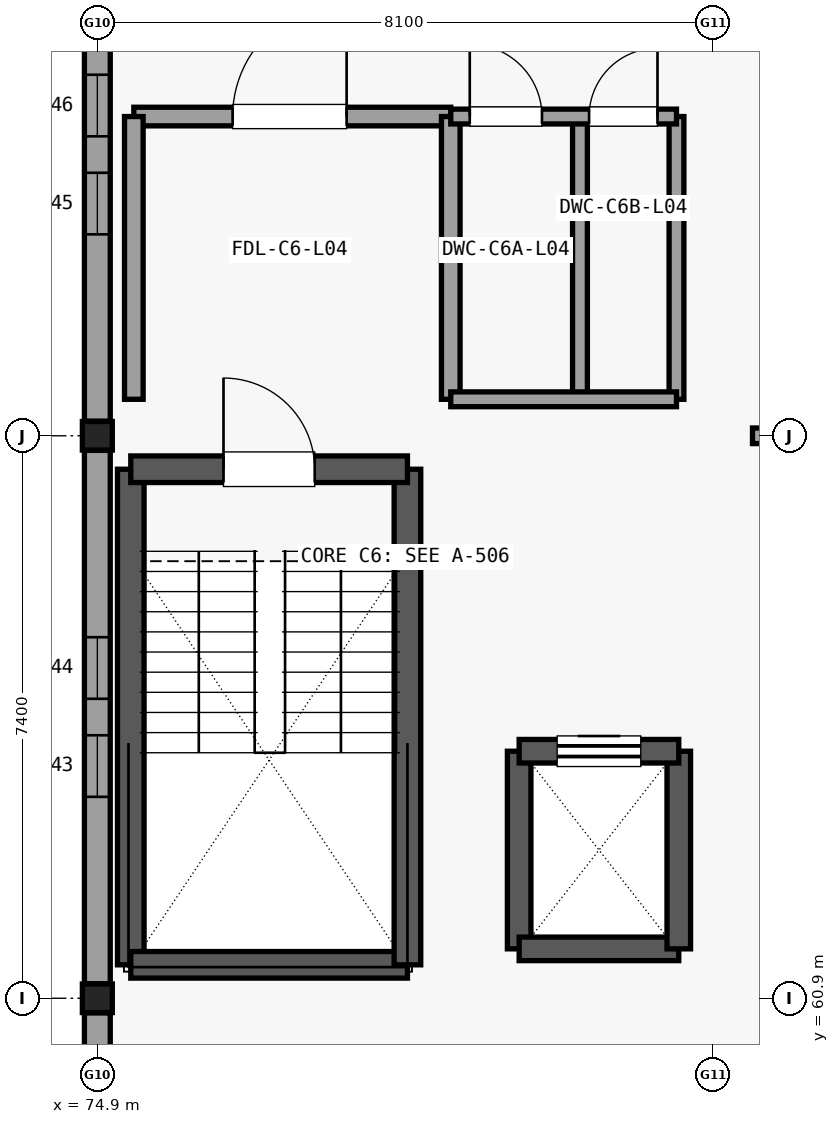
"""IFC4 building model, lengths in metres.
Left out: names, types, materials, properties, quantities, classifications, styles, units other than length and angle.
Written with IfcOpenShell. Run it as: python <this file> out.ifc"""

import sys

from ifc_helpers import new_model, si_unit, direction, frame, frame_2d, origin, origin_2d, place, context, subcontext, project, spatial, rectangle, i_section, extrude, element, fill, save


model = new_model("IFC4")
c1 = context("Model", 3, precision=1e-05, world=origin(), true_north=direction((0.0, 1.0)))
c2 = subcontext(c1, "Body", "Model", "MODEL_VIEW")
j1 = project(units=[si_unit("LENGTHUNIT", "METRE"), si_unit("PLANEANGLEUNIT", "RADIAN")], contexts=[c1])
p1 = place(None, origin())
s1 = spatial("IfcSite", under=j1, at=p1, CompositionType="ELEMENT")
p2 = place(p1, origin())
s2 = spatial("IfcBuilding", under=s1, at=p2, CompositionType="ELEMENT")
p3 = place(p2, frame((0.0, 0.0, 17.4)))
s3 = spatial("IfcBuildingStorey", under=s2, at=p3, CompositionType="ELEMENT", Elevation=17.4)
for number, where, z_axis, x_axis in (
    (1, (74.9, 60.9, 0.0), (0.0, 0.0, 1.0), (1.0, 0.0, 0.0)),
    (2, (74.9, 68.3, 0.0), (0.0, 0.0, 1.0), (1.0, 0.0, 0.0)),
):
    element("IfcColumn", number, at=place(p3, frame(where, z_axis=z_axis, x_axis=x_axis)), inside=s3, PredefinedType="COLUMN", context=c2, shape_type="SweptSolid", body=[
        extrude(i_section(OverallWidth=0.394, OverallDepth=0.376, WebThickness=0.017, FlangeThickness=0.028, at=origin_2d()), origin(), (0.0, 0.0, 1.0), 3.38),
    ])
p4 = place(p3, frame((74.9, 53.692, 0.0), z_axis=(0.0, 0.0, 1.0), x_axis=(0.0, 1.0, 0.0)))
e3 = element("IfcWall", 3, at=p4, inside=s3, PredefinedType="SOLIDWALL", context=c2, shape_type="SweptSolid", body=[
    extrude(rectangle(XDim=7.016, YDim=0.34, at=frame_2d((3.508, 0.0))), origin(), (0.0, 0.0, 1.0), 2.681),
])
p5 = place(p4, frame((2.458, 0.0, 0.6)))
e4 = element("IfcOpeningElement", 4, at=p5, cuts=e3, PredefinedType="OPENING", context=c2, shape_type="SweptSolid", body=[
    extrude(rectangle(XDim=0.81, YDim=1.84, at=frame_2d((0.405, 0.92))), frame((0.0, 0.18, 0.0), z_axis=(0.0, -1.0, 0.0), x_axis=(1.0, 0.0, 0.0)), (0.0, 0.0, 1.0), 0.36),
])
p6 = place(p4, frame((3.748, 0.0, 0.6)))
e5 = element("IfcOpeningElement", 5, at=p6, cuts=e3, PredefinedType="OPENING", context=c2, shape_type="SweptSolid", body=[
    extrude(rectangle(XDim=0.81, YDim=1.84, at=frame_2d((0.405, 0.92))), frame((0.0, 0.18, 0.0), z_axis=(0.0, -1.0, 0.0), x_axis=(1.0, 0.0, 0.0)), (0.0, 0.0, 1.0), 0.36),
])
p7 = place(p3, frame((74.9, 61.092, 0.0), z_axis=(0.0, 0.0, 1.0), x_axis=(0.0, 1.0, 0.0)))
e6 = element("IfcWall", 6, at=p7, inside=s3, PredefinedType="SOLIDWALL", context=c2, shape_type="SweptSolid", body=[
    extrude(rectangle(XDim=7.016, YDim=0.34, at=frame_2d((3.508, 0.0))), origin(), (0.0, 0.0, 1.0), 2.681),
])
p8 = place(p7, frame((2.458, 0.0, 0.6)))
e7 = element("IfcOpeningElement", 7, at=p8, cuts=e6, PredefinedType="OPENING", context=c2, shape_type="SweptSolid", body=[
    extrude(rectangle(XDim=0.81, YDim=1.84, at=frame_2d((0.405, 0.92))), frame((0.0, 0.18, 0.0), z_axis=(0.0, -1.0, 0.0), x_axis=(1.0, 0.0, 0.0)), (0.0, 0.0, 1.0), 0.36),
])
p9 = place(p7, frame((3.748, 0.0, 0.6)))
e8 = element("IfcOpeningElement", 8, at=p9, cuts=e6, PredefinedType="OPENING", context=c2, shape_type="SweptSolid", body=[
    extrude(rectangle(XDim=0.81, YDim=1.84, at=frame_2d((0.405, 0.92))), frame((0.0, 0.18, 0.0), z_axis=(0.0, -1.0, 0.0), x_axis=(1.0, 0.0, 0.0)), (0.0, 0.0, 1.0), 0.36),
])
p10 = place(p3, frame((74.9, 68.492, 0.0), z_axis=(0.0, 0.0, 1.0), x_axis=(0.0, 1.0, 0.0)))
e9 = element("IfcWall", 9, at=p10, inside=s3, PredefinedType="SOLIDWALL", context=c2, shape_type="SweptSolid", body=[
    extrude(rectangle(XDim=7.016, YDim=0.34, at=frame_2d((3.508, 0.0))), origin(), (0.0, 0.0, 1.0), 2.681),
])
p11 = place(p10, frame((2.458, 0.0, 0.6)))
e10 = element("IfcOpeningElement", 10, at=p11, cuts=e9, PredefinedType="OPENING", context=c2, shape_type="SweptSolid", body=[
    extrude(rectangle(XDim=0.81, YDim=1.84, at=frame_2d((0.405, 0.92))), frame((0.0, 0.18, 0.0), z_axis=(0.0, -1.0, 0.0), x_axis=(1.0, 0.0, 0.0)), (0.0, 0.0, 1.0), 0.36),
])
p12 = place(p10, frame((3.748, 0.0, 0.6)))
e11 = element("IfcOpeningElement", 11, at=p12, cuts=e9, PredefinedType="OPENING", context=c2, shape_type="SweptSolid", body=[
    extrude(rectangle(XDim=0.81, YDim=1.84, at=frame_2d((0.405, 0.92))), frame((0.0, 0.18, 0.0), z_axis=(0.0, -1.0, 0.0), x_axis=(1.0, 0.0, 0.0)), (0.0, 0.0, 1.0), 0.36),
])
p13 = place(p3, frame((75.34, 61.34, 0.0), z_axis=(0.0, 0.0, 1.0), x_axis=(0.0, 1.0, 0.0)))
e12 = element("IfcWall", 12, at=p13, inside=s3, PredefinedType="SHEAR", context=c2, shape_type="SweptSolid", body=[
    extrude(rectangle(XDim=6.52, YDim=0.35, at=frame_2d((3.26, 0.0))), origin(), (0.0, 0.0, 1.0), 3.375),
])
p14 = place(p3, frame((75.34, 61.34, 0.0), z_axis=(0.0, 0.0, 1.0), x_axis=(1.0, 0.0, 0.0)))
e13 = element("IfcWall", 13, at=p14, inside=s3, PredefinedType="SHEAR", context=c2, shape_type="SweptSolid", body=[
    extrude(rectangle(XDim=3.64, YDim=0.35, at=frame_2d((1.82, 0.0))), origin(), (0.0, 0.0, 1.0), 3.375),
])
p15 = place(p3, frame((78.98, 61.34, 0.0), z_axis=(0.0, 0.0, 1.0), x_axis=(0.0, 1.0, 0.0)))
e14 = element("IfcWall", 14, at=p15, inside=s3, PredefinedType="SHEAR", context=c2, shape_type="SweptSolid", body=[
    extrude(rectangle(XDim=6.52, YDim=0.35, at=frame_2d((3.26, 0.0))), origin(), (0.0, 0.0, 1.0), 3.375),
])
p16 = place(p3, frame((75.34, 67.86, 0.0), z_axis=(0.0, 0.0, 1.0), x_axis=(1.0, 0.0, 0.0)))
e15 = element("IfcWall", 15, at=p16, inside=s3, PredefinedType="SHEAR", context=c2, shape_type="SweptSolid", body=[
    extrude(rectangle(XDim=3.64, YDim=0.35, at=frame_2d((1.82, 0.0))), origin(), (0.0, 0.0, 1.0), 3.375),
])
p17 = place(p16, frame((1.22, 0.0, 0.0)))
e16 = element("IfcOpeningElement", 16, at=p17, cuts=e15, PredefinedType="OPENING", context=c2, shape_type="SweptSolid", body=[
    extrude(rectangle(XDim=1.2, YDim=2.15, at=frame_2d((0.6, 1.075))), frame((0.0, 0.185, 0.0), z_axis=(0.0, -1.0, 0.0), x_axis=(1.0, 0.0, 0.0)), (0.0, 0.0, 1.0), 0.37),
])
p18 = place(p3, frame((80.45, 61.55, 0.0), z_axis=(0.0, 0.0, 1.0), x_axis=(0.0, 1.0, 0.0)))
e17 = element("IfcWall", 17, at=p18, inside=s3, PredefinedType="SHEAR", context=c2, shape_type="SweptSolid", body=[
    extrude(rectangle(XDim=2.6, YDim=0.31, at=frame_2d((1.3, 0.0))), origin(), (0.0, 0.0, 1.0), 3.375),
])
p19 = place(p3, frame((80.45, 61.55, 0.0), z_axis=(0.0, 0.0, 1.0), x_axis=(1.0, 0.0, 0.0)))
e18 = element("IfcWall", 18, at=p19, inside=s3, PredefinedType="SHEAR", context=c2, shape_type="SweptSolid", body=[
    extrude(rectangle(XDim=2.1, YDim=0.31, at=frame_2d((1.05, 0.0))), origin(), (0.0, 0.0, 1.0), 3.375),
])
p20 = place(p3, frame((82.55, 61.55, 0.0), z_axis=(0.0, 0.0, 1.0), x_axis=(0.0, 1.0, 0.0)))
e19 = element("IfcWall", 19, at=p20, inside=s3, PredefinedType="SHEAR", context=c2, shape_type="SweptSolid", body=[
    extrude(rectangle(XDim=2.6, YDim=0.31, at=frame_2d((1.3, 0.0))), origin(), (0.0, 0.0, 1.0), 3.375),
])
p21 = place(p3, frame((80.45, 64.15, 0.0), z_axis=(0.0, 0.0, 1.0), x_axis=(1.0, 0.0, 0.0)))
e20 = element("IfcWall", 20, at=p21, inside=s3, PredefinedType="SHEAR", context=c2, shape_type="SweptSolid", body=[
    extrude(rectangle(XDim=2.1, YDim=0.31, at=frame_2d((1.05, 0.0))), origin(), (0.0, 0.0, 1.0), 3.375),
])
p22 = place(p21, frame((0.5, 0.0, 0.0)))
e21 = element("IfcOpeningElement", 21, at=p22, cuts=e20, PredefinedType="OPENING", context=c2, shape_type="SweptSolid", body=[
    extrude(rectangle(XDim=1.1, YDim=2.15, at=frame_2d((0.55, 1.075))), frame((0.0, 0.165, 0.0), z_axis=(0.0, -1.0, 0.0), x_axis=(1.0, 0.0, 0.0)), (0.0, 0.0, 1.0), 0.33),
])
p23 = place(p3, frame((75.38, 72.5, 0.0), z_axis=(0.0, 0.0, 1.0), x_axis=(1.0, 0.0, 0.0)))
e22 = element("IfcWall", 22, at=p23, inside=s3, PredefinedType="PARTITIONING", context=c2, shape_type="SweptSolid", body=[
    extrude(rectangle(XDim=4.17, YDim=0.245, at=frame_2d((2.085, 0.0))), origin(), (0.0, 0.0, 1.0), 2.686),
])
p24 = place(p23, frame((1.3, 0.0, 0.0)))
e23 = element("IfcOpeningElement", 23, at=p24, cuts=e22, PredefinedType="OPENING", context=c2, shape_type="SweptSolid", body=[
    extrude(rectangle(XDim=1.5, YDim=2.15, at=frame_2d((0.75, 1.075))), frame((0.0, 0.133, 0.0), z_axis=(0.0, -1.0, 0.0), x_axis=(1.0, 0.0, 0.0)), (0.0, 0.0, 1.0), 0.265),
])
for number, where, z_axis, x_axis in (
    (24, (75.38, 68.78, 0.0), (0.0, 0.0, 1.0), (0.0, 1.0, 0.0)),
    (25, (79.55, 68.78, 0.0), (0.0, 0.0, 1.0), (0.0, 1.0, 0.0)),
):
    element("IfcWall", number, at=place(p3, frame(where, z_axis=z_axis, x_axis=x_axis)), inside=s3, PredefinedType="PARTITIONING", context=c2, shape_type="SweptSolid", body=[
        extrude(rectangle(XDim=3.72, YDim=0.245, at=frame_2d((1.86, 0.0))), origin(), (0.0, 0.0, 1.0), 2.686),
    ])
for number, where, z_axis, x_axis in (
    (26, (81.25, 68.78, 0.0), (0.0, 0.0, 1.0), (0.0, 1.0, 0.0)),
    (27, (82.52, 68.78, 0.0), (0.0, 0.0, 1.0), (0.0, 1.0, 0.0)),
):
    element("IfcWall", number, at=place(p3, frame(where, z_axis=z_axis, x_axis=x_axis)), inside=s3, PredefinedType="PARTITIONING", context=c2, shape_type="SweptSolid", body=[
        extrude(rectangle(XDim=3.72, YDim=0.195, at=frame_2d((1.86, 0.0))), origin(), (0.0, 0.0, 1.0), 2.686),
    ])
p25 = place(p3, frame((79.55, 68.78, 0.0), z_axis=(0.0, 0.0, 1.0), x_axis=(1.0, 0.0, 0.0)))
e28 = element("IfcWall", 28, at=p25, inside=s3, PredefinedType="PARTITIONING", context=c2, shape_type="SweptSolid", body=[
    extrude(rectangle(XDim=2.97, YDim=0.195, at=frame_2d((1.485, 0.0))), origin(), (0.0, 0.0, 1.0), 2.686),
])
p26 = place(p3, frame((79.55, 72.5, 0.0), z_axis=(0.0, 0.0, 1.0), x_axis=(1.0, 0.0, 0.0)))
e29 = element("IfcWall", 29, at=p26, inside=s3, PredefinedType="PARTITIONING", context=c2, shape_type="SweptSolid", body=[
    extrude(rectangle(XDim=2.97, YDim=0.195, at=frame_2d((1.485, 0.0))), origin(), (0.0, 0.0, 1.0), 2.686),
])
p27 = place(p26, frame((0.25, 0.0, 0.0)))
e30 = element("IfcOpeningElement", 30, at=p27, cuts=e29, PredefinedType="OPENING", context=c2, shape_type="SweptSolid", body=[
    extrude(rectangle(XDim=0.95, YDim=2.1, at=frame_2d((0.475, 1.05))), frame((0.0, 0.107, 0.0), z_axis=(0.0, -1.0, 0.0), x_axis=(1.0, 0.0, 0.0)), (0.0, 0.0, 1.0), 0.215),
])
p28 = place(p26, frame((1.82, 0.0, 0.0)))
e31 = element("IfcOpeningElement", 31, at=p28, cuts=e29, PredefinedType="OPENING", context=c2, shape_type="SweptSolid", body=[
    extrude(rectangle(XDim=0.9, YDim=2.1, at=frame_2d((0.45, 1.05))), frame((0.0, 0.107, 0.0), z_axis=(0.0, -1.0, 0.0), x_axis=(1.0, 0.0, 0.0)), (0.0, 0.0, 1.0), 0.215),
])
p29 = place(p3, frame((83.52, 68.3, 0.0), z_axis=(0.0, 0.0, 1.0), x_axis=(1.0, 0.0, 0.0)))
e32 = element("IfcWall", 32, at=p29, inside=s3, PredefinedType="PARTITIONING", context=c2, shape_type="SweptSolid", body=[
    extrude(rectangle(XDim=7.06, YDim=0.205, at=frame_2d((3.53, 0.0))), origin(), (0.0, 0.0, 1.0), 2.686),
])
p30 = place(p29, frame((2.755, 0.0, 0.0)))
e33 = element("IfcOpeningElement", 33, at=p30, cuts=e32, PredefinedType="OPENING", context=c2, shape_type="SweptSolid", body=[
    extrude(rectangle(XDim=1.55, YDim=2.2, at=frame_2d((0.775, 1.1))), frame((0.0, 0.113, 0.0), z_axis=(0.0, -1.0, 0.0), x_axis=(1.0, 0.0, 0.0)), (0.0, 0.0, 1.0), 0.225),
])
p31 = place(p8, origin())
e34 = element("IfcWindow", 34, at=p31, inside=s3, PartitioningType="SINGLE_PANEL", PredefinedType="WINDOW", context=c2, shape_type="SweptSolid", body=[
    extrude(rectangle(XDim=0.81, YDim=1.84, at=frame_2d((0.405, 0.92))), frame((0.0, 0.03, 0.0), z_axis=(0.0, -1.0, 0.0), x_axis=(1.0, 0.0, 0.0)), (0.0, 0.0, 1.0), 0.06),
])
fill(e7, e34)
p32 = place(p9, origin())
e35 = element("IfcWindow", 35, at=p32, inside=s3, PartitioningType="SINGLE_PANEL", PredefinedType="WINDOW", context=c2, shape_type="SweptSolid", body=[
    extrude(rectangle(XDim=0.81, YDim=1.84, at=frame_2d((0.405, 0.92))), frame((0.0, 0.03, 0.0), z_axis=(0.0, -1.0, 0.0), x_axis=(1.0, 0.0, 0.0)), (0.0, 0.0, 1.0), 0.06),
])
fill(e8, e35)
p33 = place(p11, origin())
e36 = element("IfcWindow", 36, at=p33, inside=s3, PartitioningType="SINGLE_PANEL", PredefinedType="WINDOW", context=c2, shape_type="SweptSolid", body=[
    extrude(rectangle(XDim=0.81, YDim=1.84, at=frame_2d((0.405, 0.92))), frame((0.0, 0.03, 0.0), z_axis=(0.0, -1.0, 0.0), x_axis=(1.0, 0.0, 0.0)), (0.0, 0.0, 1.0), 0.06),
])
fill(e10, e36)
p34 = place(p12, origin())
e37 = element("IfcWindow", 37, at=p34, inside=s3, PartitioningType="SINGLE_PANEL", PredefinedType="WINDOW", context=c2, shape_type="SweptSolid", body=[
    extrude(rectangle(XDim=0.81, YDim=1.84, at=frame_2d((0.405, 0.92))), frame((0.0, 0.03, 0.0), z_axis=(0.0, -1.0, 0.0), x_axis=(1.0, 0.0, 0.0)), (0.0, 0.0, 1.0), 0.06),
])
fill(e11, e37)
p35 = place(p17, origin())
e38 = element("IfcDoor", 38, at=p35, inside=s3, OperationType="SINGLE_SWING_LEFT", PredefinedType="DOOR", context=c2, shape_type="SweptSolid", body=[
    extrude(rectangle(XDim=1.2, YDim=2.15, at=frame_2d((0.6, 1.075))), frame((0.0, 0.025, 0.0), z_axis=(0.0, -1.0, 0.0), x_axis=(1.0, 0.0, 0.0)), (0.0, 0.0, 1.0), 0.05),
])
fill(e16, e38)
p36 = place(p22, origin())
e39 = element("IfcDoor", 39, at=p36, inside=s3, OperationType="SLIDING_TO_RIGHT", PredefinedType="DOOR", context=c2, shape_type="SweptSolid", body=[
    extrude(rectangle(XDim=1.1, YDim=2.15, at=frame_2d((0.55, 1.075))), frame((0.0, 0.025, 0.0), z_axis=(0.0, -1.0, 0.0), x_axis=(1.0, 0.0, 0.0)), (0.0, 0.0, 1.0), 0.05),
])
fill(e21, e39)
p37 = place(p24, origin())
e40 = element("IfcDoor", 40, at=p37, inside=s3, OperationType="SINGLE_SWING_RIGHT", PredefinedType="DOOR", context=c2, shape_type="SweptSolid", body=[
    extrude(rectangle(XDim=1.5, YDim=2.15, at=frame_2d((0.75, 1.075))), frame((0.0, 0.025, 0.0), z_axis=(0.0, -1.0, 0.0), x_axis=(1.0, 0.0, 0.0)), (0.0, 0.0, 1.0), 0.05),
])
fill(e23, e40)
p38 = place(p27, origin())
e41 = element("IfcDoor", 41, at=p38, inside=s3, OperationType="SINGLE_SWING_LEFT", PredefinedType="DOOR", context=c2, shape_type="SweptSolid", body=[
    extrude(rectangle(XDim=0.95, YDim=2.1, at=frame_2d((0.475, 1.05))), frame((0.0, 0.025, 0.0), z_axis=(0.0, -1.0, 0.0), x_axis=(1.0, 0.0, 0.0)), (0.0, 0.0, 1.0), 0.05),
])
fill(e30, e41)
p39 = place(p28, origin())
e42 = element("IfcDoor", 42, at=p39, inside=s3, OperationType="SINGLE_SWING_RIGHT", PredefinedType="DOOR", context=c2, shape_type="SweptSolid", body=[
    extrude(rectangle(XDim=0.9, YDim=2.1, at=frame_2d((0.45, 1.05))), frame((0.0, 0.025, 0.0), z_axis=(0.0, -1.0, 0.0), x_axis=(1.0, 0.0, 0.0)), (0.0, 0.0, 1.0), 0.05),
])
fill(e31, e42)
save(model, sys.argv[1])
